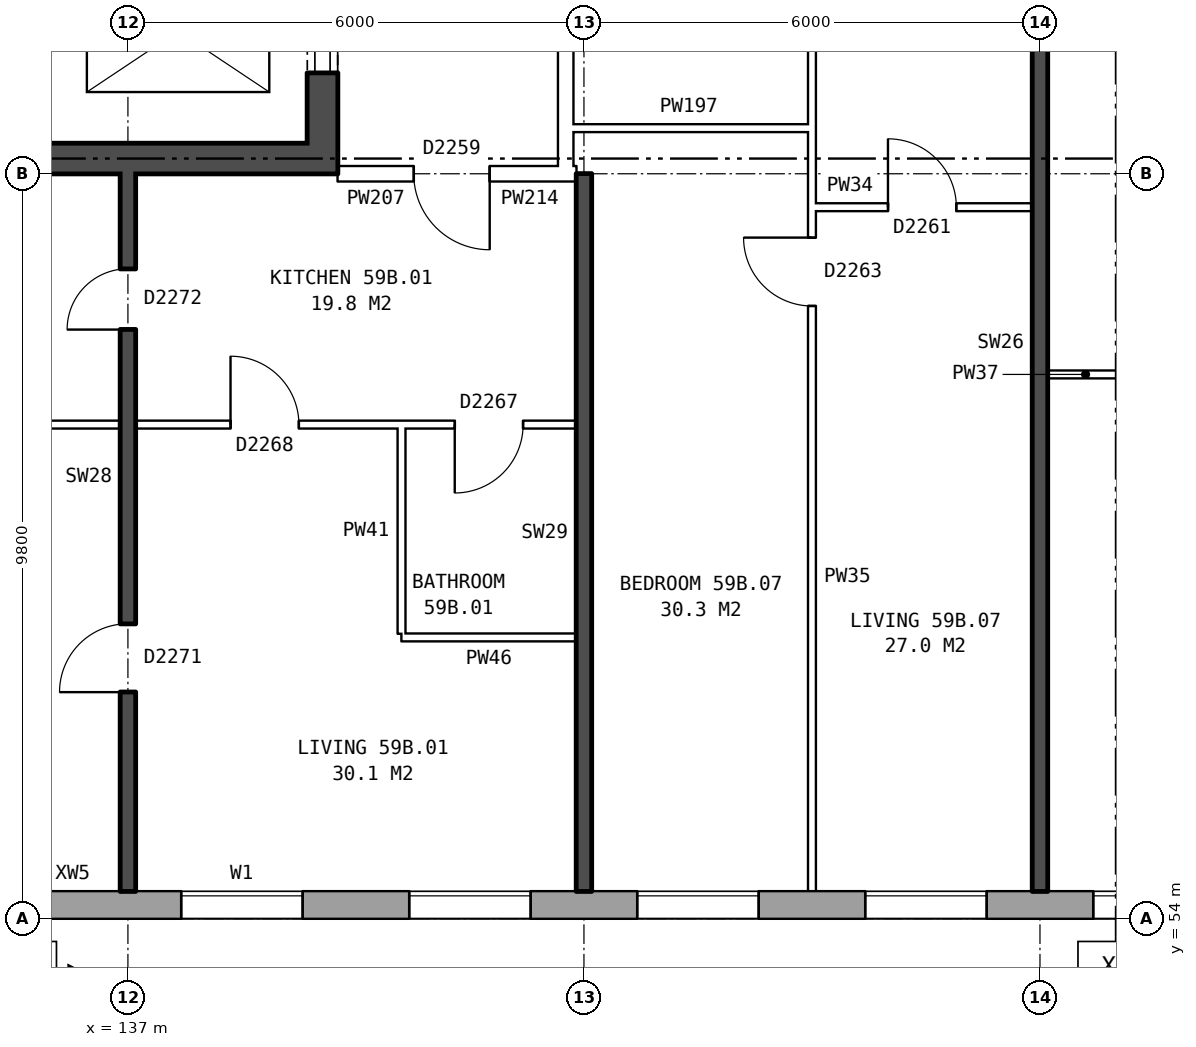
"""IFC4 building model, lengths in metres.
Left out: names, types, materials, properties, quantities, classifications, styles, units other than length and angle.
Written with IfcOpenShell. Run it as: python <this file> out.ifc"""

import sys

from ifc_helpers import new_model, si_unit, direction, frame, frame_2d, origin, place, context, subcontext, project, spatial, rectangle, extrude, element, fill, save


model = new_model("IFC4")
c1 = context("Model", 3, precision=1e-05, world=origin(), true_north=direction((0.0, 1.0)))
c2 = subcontext(c1, "Body", "Model", "MODEL_VIEW")
j1 = project(units=[si_unit("LENGTHUNIT", "METRE"), si_unit("PLANEANGLEUNIT", "RADIAN")], contexts=[c1])
p1 = place(None, origin())
s1 = spatial("IfcSite", under=j1, at=p1, CompositionType="ELEMENT")
p2 = place(p1, origin())
s2 = spatial("IfcBuilding", under=s1, at=p2, CompositionType="ELEMENT")
p3 = place(p2, frame((0.0, 0.0, 209.0)))
s3 = spatial("IfcBuildingStorey", under=s2, at=p3, CompositionType="ELEMENT", Elevation=209.0)
p4 = place(p3, frame((132.05, 54.18, 0.0), z_axis=(0.0, 0.0, 1.0), x_axis=(1.0, 0.0, 0.0)))
e1 = element("IfcWall", 1, at=p4, inside=s3, PredefinedType="STANDARD", context=c2, shape_type="SweptSolid", body=[
    extrude(rectangle(XDim=33.875, YDim=0.36, at=frame_2d((16.938, 0.0))), origin(), (0.0, 0.0, 1.0), 2.85),
])
p5 = place(p4, frame((0.3, 0.0, 0.8)))
e2 = element("IfcOpeningElement", 2, at=p5, cuts=e1, PredefinedType="OPENING", context=c2, shape_type="SweptSolid", body=[
    extrude(rectangle(XDim=1.4, YDim=1.8, at=frame_2d((0.7, 0.9))), frame((0.0, 0.19, 0.0), z_axis=(0.0, -1.0, 0.0), x_axis=(1.0, 0.0, 0.0)), (0.0, 0.0, 1.0), 0.38),
])
p6 = place(p4, frame((5.65, 0.0, 0.8)))
e3 = element("IfcOpeningElement", 3, at=p6, cuts=e1, PredefinedType="OPENING", context=c2, shape_type="SweptSolid", body=[
    extrude(rectangle(XDim=1.6, YDim=1.8, at=frame_2d((0.8, 0.9))), frame((0.0, 0.19, 0.0), z_axis=(0.0, -1.0, 0.0), x_axis=(1.0, 0.0, 0.0)), (0.0, 0.0, 1.0), 0.38),
])
p7 = place(p4, frame((8.65, 0.0, 0.8)))
e4 = element("IfcOpeningElement", 4, at=p7, cuts=e1, PredefinedType="OPENING", context=c2, shape_type="SweptSolid", body=[
    extrude(rectangle(XDim=1.6, YDim=1.8, at=frame_2d((0.8, 0.9))), frame((0.0, 0.19, 0.0), z_axis=(0.0, -1.0, 0.0), x_axis=(1.0, 0.0, 0.0)), (0.0, 0.0, 1.0), 0.38),
])
p8 = place(p4, frame((11.65, 0.0, 0.8)))
e5 = element("IfcOpeningElement", 5, at=p8, cuts=e1, PredefinedType="OPENING", context=c2, shape_type="SweptSolid", body=[
    extrude(rectangle(XDim=1.6, YDim=1.8, at=frame_2d((0.8, 0.9))), frame((0.0, 0.19, 0.0), z_axis=(0.0, -1.0, 0.0), x_axis=(1.0, 0.0, 0.0)), (0.0, 0.0, 1.0), 0.38),
])
p9 = place(p4, frame((14.65, 0.0, 0.8)))
e6 = element("IfcOpeningElement", 6, at=p9, cuts=e1, PredefinedType="OPENING", context=c2, shape_type="SweptSolid", body=[
    extrude(rectangle(XDim=1.6, YDim=1.8, at=frame_2d((0.8, 0.9))), frame((0.0, 0.19, 0.0), z_axis=(0.0, -1.0, 0.0), x_axis=(1.0, 0.0, 0.0)), (0.0, 0.0, 1.0), 0.38),
])
p10 = place(p4, frame((17.65, 0.0, 0.8)))
e7 = element("IfcOpeningElement", 7, at=p10, cuts=e1, PredefinedType="OPENING", context=c2, shape_type="SweptSolid", body=[
    extrude(rectangle(XDim=1.6, YDim=1.8, at=frame_2d((0.8, 0.9))), frame((0.0, 0.19, 0.0), z_axis=(0.0, -1.0, 0.0), x_axis=(1.0, 0.0, 0.0)), (0.0, 0.0, 1.0), 0.38),
])
p11 = place(p4, frame((20.65, 0.0, 0.8)))
e8 = element("IfcOpeningElement", 8, at=p11, cuts=e1, PredefinedType="OPENING", context=c2, shape_type="SweptSolid", body=[
    extrude(rectangle(XDim=1.6, YDim=1.8, at=frame_2d((0.8, 0.9))), frame((0.0, 0.19, 0.0), z_axis=(0.0, -1.0, 0.0), x_axis=(1.0, 0.0, 0.0)), (0.0, 0.0, 1.0), 0.38),
])
p12 = place(p4, frame((23.65, 0.0, 0.8)))
e9 = element("IfcOpeningElement", 9, at=p12, cuts=e1, PredefinedType="OPENING", context=c2, shape_type="SweptSolid", body=[
    extrude(rectangle(XDim=1.6, YDim=1.8, at=frame_2d((0.8, 0.9))), frame((0.0, 0.19, 0.0), z_axis=(0.0, -1.0, 0.0), x_axis=(1.0, 0.0, 0.0)), (0.0, 0.0, 1.0), 0.38),
])
p13 = place(p4, frame((26.65, 0.0, 0.8)))
e10 = element("IfcOpeningElement", 10, at=p13, cuts=e1, PredefinedType="OPENING", context=c2, shape_type="SweptSolid", body=[
    extrude(rectangle(XDim=1.6, YDim=1.8, at=frame_2d((0.8, 0.9))), frame((0.0, 0.19, 0.0), z_axis=(0.0, -1.0, 0.0), x_axis=(1.0, 0.0, 0.0)), (0.0, 0.0, 1.0), 0.38),
])
p14 = place(p4, frame((29.65, 0.0, 0.8)))
e11 = element("IfcOpeningElement", 11, at=p14, cuts=e1, PredefinedType="OPENING", context=c2, shape_type="SweptSolid", body=[
    extrude(rectangle(XDim=1.6, YDim=1.8, at=frame_2d((0.8, 0.9))), frame((0.0, 0.19, 0.0), z_axis=(0.0, -1.0, 0.0), x_axis=(1.0, 0.0, 0.0)), (0.0, 0.0, 1.0), 0.38),
])
p15 = place(p4, frame((2.0, 0.0, 0.9)))
e12 = element("IfcOpeningElement", 12, at=p15, cuts=e1, PredefinedType="OPENING", context=c2, shape_type="SweptSolid", body=[
    extrude(rectangle(XDim=0.8, YDim=1.5, at=frame_2d((0.4, 0.75))), frame((0.0, 0.19, 0.0), z_axis=(0.0, -1.0, 0.0), x_axis=(1.0, 0.0, 0.0)), (0.0, 0.0, 1.0), 0.38),
])
p16 = place(p3, frame((139.56, 63.8, 0.0), z_axis=(0.0, 0.0, 1.0), x_axis=(0.0, 1.0, 0.0)))
e13 = element("IfcWall", 13, at=p16, inside=s3, PredefinedType="SHEAR", context=c2, shape_type="SweptSolid", body=[
    extrude(rectangle(XDim=12.4, YDim=0.4, at=frame_2d((6.2, 0.0))), origin(), (0.0, 0.0, 1.0), 2.85),
])
p17 = place(p16, frame((1.325, 0.0, 0.0)))
e14 = element("IfcOpeningElement", 14, at=p17, cuts=e13, PredefinedType="OPENING", context=c2, shape_type="SweptSolid", body=[
    extrude(rectangle(XDim=1.1, YDim=2.1, at=frame_2d((0.55, 1.05))), frame((0.0, 0.21, 0.0), z_axis=(0.0, -1.0, 0.0), x_axis=(1.0, 0.0, 0.0)), (0.0, 0.0, 1.0), 0.42),
])
p18 = place(p16, frame((3.6, 0.0, 0.0)))
e15 = element("IfcOpeningElement", 15, at=p18, cuts=e13, PredefinedType="OPENING", context=c2, shape_type="SweptSolid", body=[
    extrude(rectangle(XDim=1.1, YDim=2.1, at=frame_2d((0.55, 1.05))), frame((0.0, 0.21, 0.0), z_axis=(0.0, -1.0, 0.0), x_axis=(1.0, 0.0, 0.0)), (0.0, 0.0, 1.0), 0.42),
])
p19 = place(p16, frame((5.8, 0.0, 0.0)))
e16 = element("IfcOpeningElement", 16, at=p19, cuts=e13, PredefinedType="OPENING", context=c2, shape_type="SweptSolid", body=[
    extrude(rectangle(XDim=1.1, YDim=2.1, at=frame_2d((0.55, 1.05))), frame((0.0, 0.21, 0.0), z_axis=(0.0, -1.0, 0.0), x_axis=(1.0, 0.0, 0.0)), (0.0, 0.0, 1.0), 0.42),
])
p20 = place(p16, frame((9.9, 0.0, 0.0)))
e17 = element("IfcOpeningElement", 17, at=p20, cuts=e13, PredefinedType="OPENING", context=c2, shape_type="SweptSolid", body=[
    extrude(rectangle(XDim=1.1, YDim=2.1, at=frame_2d((0.55, 1.05))), frame((0.0, 0.21, 0.0), z_axis=(0.0, -1.0, 0.0), x_axis=(1.0, 0.0, 0.0)), (0.0, 0.0, 1.0), 0.42),
])
p21 = place(p16, frame((8.125, 0.0, 0.0)))
e18 = element("IfcOpeningElement", 18, at=p21, cuts=e13, PredefinedType="OPENING", context=c2, shape_type="SweptSolid", body=[
    extrude(rectangle(XDim=0.85, YDim=2.1, at=frame_2d((0.425, 1.05))), frame((0.0, 0.21, 0.0), z_axis=(0.0, -1.0, 0.0), x_axis=(1.0, 0.0, 0.0)), (0.0, 0.0, 1.0), 0.42),
])
p22 = place(p3, frame((139.36, 64.0, 0.0), z_axis=(0.0, 0.0, 1.0), x_axis=(-1.0, 0.0, 0.0)))
e19 = element("IfcWall", 19, at=p22, inside=s3, PredefinedType="SHEAR", context=c2, shape_type="SweptSolid", body=[
    extrude(rectangle(XDim=7.6, YDim=0.4, at=frame_2d((3.8, 0.0))), origin(), (0.0, 0.0, 1.0), 2.85),
])
p23 = place(p3, frame((142.76, 63.9, 0.0), z_axis=(0.0, 0.0, 1.0), x_axis=(0.0, 1.0, 0.0)))
e20 = element("IfcWall", 20, at=p23, inside=s3, PredefinedType="PARTITIONING", context=c2, shape_type="SweptSolid", body=[
    extrude(rectangle(XDim=12.2, YDim=0.2, at=frame_2d((6.1, 0.0))), origin(), (0.0, 0.0, 1.0), 2.85),
])
p24 = place(p23, frame((5.1, 0.0, 0.0)))
e21 = element("IfcOpeningElement", 21, at=p24, cuts=e20, PredefinedType="OPENING", context=c2, shape_type="SweptSolid", body=[
    extrude(rectangle(XDim=2.0, YDim=2.1, at=frame_2d((1.0, 1.05))), frame((0.0, 0.11, 0.0), z_axis=(0.0, -1.0, 0.0), x_axis=(1.0, 0.0, 0.0)), (0.0, 0.0, 1.0), 0.22),
])
p25 = place(p3, frame((140.6, 57.7, 0.0), z_axis=(0.0, 0.0, 1.0), x_axis=(1.0, 0.0, 0.0)))
e22 = element("IfcWall", 22, at=p25, inside=s3, PredefinedType="PARTITIONING", context=c2, shape_type="SweptSolid", body=[
    extrude(rectangle(XDim=2.3, YDim=0.1, at=frame_2d((1.15, 0.0))), origin(), (0.0, 0.0, 1.0), 2.85),
])
p26 = place(p3, frame((131.1, 60.5, 0.0), z_axis=(0.0, 0.0, 1.0), x_axis=(1.0, 0.0, 0.0)))
e23 = element("IfcWall", 23, at=p26, inside=s3, PredefinedType="PARTITIONING", context=c2, shape_type="SweptSolid", body=[
    extrude(rectangle(XDim=11.8, YDim=0.1, at=frame_2d((5.9, 0.0))), origin(), (0.0, 0.0, 1.0), 2.85),
])
p27 = place(p26, frame((7.25, 0.0, 0.0)))
e24 = element("IfcOpeningElement", 24, at=p27, cuts=e23, PredefinedType="OPENING", context=c2, shape_type="SweptSolid", body=[
    extrude(rectangle(XDim=0.9, YDim=2.1, at=frame_2d((0.45, 1.05))), frame((0.0, 0.06, 0.0), z_axis=(0.0, -1.0, 0.0), x_axis=(1.0, 0.0, 0.0)), (0.0, 0.0, 1.0), 0.12),
])
p28 = place(p26, frame((10.2, 0.0, 0.0)))
e25 = element("IfcOpeningElement", 25, at=p28, cuts=e23, PredefinedType="OPENING", context=c2, shape_type="SweptSolid", body=[
    extrude(rectangle(XDim=0.9, YDim=2.1, at=frame_2d((0.45, 1.05))), frame((0.0, 0.06, 0.0), z_axis=(0.0, -1.0, 0.0), x_axis=(1.0, 0.0, 0.0)), (0.0, 0.0, 1.0), 0.12),
])
p29 = place(p3, frame((149.1, 61.16, 0.0), z_axis=(0.0, 0.0, 1.0), x_axis=(1.0, 0.0, 0.0)))
e26 = element("IfcWall", 26, at=p29, inside=s3, PredefinedType="PARTITIONING", context=c2, shape_type="SweptSolid", body=[
    extrude(rectangle(XDim=2.9, YDim=0.1, at=frame_2d((1.45, 0.0))), origin(), (0.0, 0.0, 1.0), 2.85),
])
p30 = place(p29, frame((1.0, 0.0, 0.0)))
e27 = element("IfcOpeningElement", 27, at=p30, cuts=e26, PredefinedType="OPENING", context=c2, shape_type="SweptSolid", body=[
    extrude(rectangle(XDim=0.9, YDim=2.1, at=frame_2d((0.45, 1.05))), frame((0.0, 0.06, 0.0), z_axis=(0.0, -1.0, 0.0), x_axis=(1.0, 0.0, 0.0)), (0.0, 0.0, 1.0), 0.12),
])
p31 = place(p3, frame((146.0, 63.36, 0.0), z_axis=(0.0, 0.0, 1.0), x_axis=(1.0, 0.0, 0.0)))
e28 = element("IfcWall", 28, at=p31, inside=s3, PredefinedType="PARTITIONING", context=c2, shape_type="SweptSolid", body=[
    extrude(rectangle(XDim=2.9, YDim=0.1, at=frame_2d((1.45, 0.0))), origin(), (0.0, 0.0, 1.0), 2.85),
])
p32 = place(p31, frame((1.0, 0.0, 0.0)))
e29 = element("IfcOpeningElement", 29, at=p32, cuts=e28, PredefinedType="OPENING", context=c2, shape_type="SweptSolid", body=[
    extrude(rectangle(XDim=0.9, YDim=2.1, at=frame_2d((0.45, 1.05))), frame((0.0, 0.06, 0.0), z_axis=(0.0, -1.0, 0.0), x_axis=(1.0, 0.0, 0.0)), (0.0, 0.0, 1.0), 0.12),
])
p33 = place(p3, frame((139.76, 63.8, 0.0), z_axis=(0.0, 0.0, 1.0), x_axis=(1.0, 0.0, 0.0)))
e30 = element("IfcWall", 30, at=p33, inside=s3, PredefinedType="PARTITIONING", context=c2, shape_type="SweptSolid", body=[
    extrude(rectangle(XDim=3.0, YDim=0.2, at=frame_2d((1.5, 0.0))), origin(), (0.0, 0.0, 1.0), 2.85),
])
p34 = place(p33, frame((1.0, 0.0, 0.0)))
e31 = element("IfcOpeningElement", 31, at=p34, cuts=e30, PredefinedType="OPENING", context=c2, shape_type="SweptSolid", body=[
    extrude(rectangle(XDim=1.0, YDim=2.1, at=frame_2d((0.5, 1.05))), frame((0.0, 0.11, 0.0), z_axis=(0.0, -1.0, 0.0), x_axis=(1.0, 0.0, 0.0)), (0.0, 0.0, 1.0), 0.22),
])
p35 = place(p3, frame((142.76, 63.8, 0.0), z_axis=(0.0, 0.0, 1.0), x_axis=(1.0, 0.0, 0.0)))
e32 = element("IfcWall", 32, at=p35, inside=s3, PredefinedType="PARTITIONING", context=c2, shape_type="SweptSolid", body=[
    extrude(rectangle(XDim=0.14, YDim=0.2, at=frame_2d((0.07, 0.0))), origin(), (0.0, 0.0, 1.0), 2.85),
])
p36 = place(p3, frame((142.76, 64.4, 0.0), z_axis=(0.0, 0.0, 1.0), x_axis=(1.0, 0.0, 0.0)))
e33 = element("IfcWall", 33, at=p36, inside=s3, PredefinedType="PARTITIONING", context=c2, shape_type="SweptSolid", body=[
    extrude(rectangle(XDim=3.24, YDim=0.1, at=frame_2d((1.62, 0.0))), origin(), (0.0, 0.0, 1.0), 2.85),
])
p37 = place(p3, frame((137.0, 54.36, 0.0), z_axis=(0.0, 0.0, 1.0), x_axis=(0.0, 1.0, 0.0)))
e34 = element("IfcWall", 34, at=p37, inside=s3, PredefinedType="SOLIDWALL", context=c2, shape_type="SweptSolid", body=[
    extrude(rectangle(XDim=9.44, YDim=0.2, at=frame_2d((4.72, 0.0))), origin(), (0.0, 0.0, 1.0), 2.85),
])
p38 = place(p37, frame((2.62, 0.0, 0.0)))
e35 = element("IfcOpeningElement", 35, at=p38, cuts=e34, PredefinedType="OPENING", context=c2, shape_type="SweptSolid", body=[
    extrude(rectangle(XDim=0.9, YDim=2.1, at=frame_2d((0.45, 1.05))), frame((0.0, 0.11, 0.0), z_axis=(0.0, -1.0, 0.0), x_axis=(1.0, 0.0, 0.0)), (0.0, 0.0, 1.0), 0.22),
])
p39 = place(p37, frame((7.39, 0.0, 0.0)))
e36 = element("IfcOpeningElement", 36, at=p39, cuts=e34, PredefinedType="OPENING", context=c2, shape_type="SweptSolid", body=[
    extrude(rectangle(XDim=0.8, YDim=2.1, at=frame_2d((0.4, 1.05))), frame((0.0, 0.11, 0.0), z_axis=(0.0, -1.0, 0.0), x_axis=(1.0, 0.0, 0.0)), (0.0, 0.0, 1.0), 0.22),
])
p40 = place(p3, frame((140.6, 57.75, 0.0), z_axis=(0.0, 0.0, 1.0), x_axis=(0.0, 1.0, 0.0)))
e37 = element("IfcWall", 37, at=p40, inside=s3, PredefinedType="PARTITIONING", context=c2, shape_type="SweptSolid", body=[
    extrude(rectangle(XDim=2.7, YDim=0.1, at=frame_2d((1.35, 0.0))), origin(), (0.0, 0.0, 1.0), 2.85),
])
p41 = place(p3, frame((143.0, 54.36, 0.0), z_axis=(0.0, 0.0, 1.0), x_axis=(0.0, 1.0, 0.0)))
e38 = element("IfcWall", 38, at=p41, inside=s3, PredefinedType="SOLIDWALL", context=c2, shape_type="SweptSolid", body=[
    extrude(rectangle(XDim=9.44, YDim=0.2, at=frame_2d((4.72, 0.0))), origin(), (0.0, 0.0, 1.0), 2.85),
])
p42 = place(p3, frame((146.0, 54.36, 0.0), z_axis=(0.0, 0.0, 1.0), x_axis=(0.0, 1.0, 0.0)))
e39 = element("IfcWall", 39, at=p42, inside=s3, PredefinedType="PARTITIONING", context=c2, shape_type="SweptSolid", body=[
    extrude(rectangle(XDim=14.34, YDim=0.1, at=frame_2d((7.17, 0.0))), origin(), (0.0, 0.0, 1.0), 2.85),
])
p43 = place(p42, frame((7.7, 0.0, 0.0)))
e40 = element("IfcOpeningElement", 40, at=p43, cuts=e39, PredefinedType="OPENING", context=c2, shape_type="SweptSolid", body=[
    extrude(rectangle(XDim=0.9, YDim=2.1, at=frame_2d((0.45, 1.05))), frame((0.0, 0.06, 0.0), z_axis=(0.0, -1.0, 0.0), x_axis=(1.0, 0.0, 0.0)), (0.0, 0.0, 1.0), 0.12),
])
p44 = place(p42, frame((13.04, 0.0, 0.0)))
e41 = element("IfcOpeningElement", 41, at=p44, cuts=e39, PredefinedType="OPENING", context=c2, shape_type="SweptSolid", body=[
    extrude(rectangle(XDim=0.9, YDim=2.1, at=frame_2d((0.45, 1.05))), frame((0.0, 0.06, 0.0), z_axis=(0.0, -1.0, 0.0), x_axis=(1.0, 0.0, 0.0)), (0.0, 0.0, 1.0), 0.12),
])
p45 = place(p3, frame((149.0, 54.36, 0.0), z_axis=(0.0, 0.0, 1.0), x_axis=(0.0, 1.0, 0.0)))
e42 = element("IfcWall", 42, at=p45, inside=s3, PredefinedType="SOLIDWALL", context=c2, shape_type="SweptSolid", body=[
    extrude(rectangle(XDim=14.44, YDim=0.2, at=frame_2d((7.22, 0.0))), origin(), (0.0, 0.0, 1.0), 2.85),
])
p46 = place(p6, origin())
e43 = element("IfcWindow", 43, at=p46, inside=s3, PartitioningType="SINGLE_PANEL", PredefinedType="WINDOW", context=c2, shape_type="SweptSolid", body=[
    extrude(rectangle(XDim=1.6, YDim=1.8, at=frame_2d((0.8, 0.9))), frame((0.0, 0.15, 0.0), z_axis=(0.0, -1.0, 0.0), x_axis=(1.0, 0.0, 0.0)), (0.0, 0.0, 1.0), 0.06),
])
fill(e3, e43)
p47 = place(p7, origin())
e44 = element("IfcWindow", 44, at=p47, inside=s3, PartitioningType="SINGLE_PANEL", PredefinedType="WINDOW", context=c2, shape_type="SweptSolid", body=[
    extrude(rectangle(XDim=1.6, YDim=1.8, at=frame_2d((0.8, 0.9))), frame((0.0, 0.15, 0.0), z_axis=(0.0, -1.0, 0.0), x_axis=(1.0, 0.0, 0.0)), (0.0, 0.0, 1.0), 0.06),
])
fill(e4, e44)
p48 = place(p8, origin())
e45 = element("IfcWindow", 45, at=p48, inside=s3, PartitioningType="SINGLE_PANEL", PredefinedType="WINDOW", context=c2, shape_type="SweptSolid", body=[
    extrude(rectangle(XDim=1.6, YDim=1.8, at=frame_2d((0.8, 0.9))), frame((0.0, 0.15, 0.0), z_axis=(0.0, -1.0, 0.0), x_axis=(1.0, 0.0, 0.0)), (0.0, 0.0, 1.0), 0.06),
])
fill(e5, e45)
p49 = place(p9, origin())
e46 = element("IfcWindow", 46, at=p49, inside=s3, PartitioningType="SINGLE_PANEL", PredefinedType="WINDOW", context=c2, shape_type="SweptSolid", body=[
    extrude(rectangle(XDim=1.6, YDim=1.8, at=frame_2d((0.8, 0.9))), frame((0.0, 0.15, 0.0), z_axis=(0.0, -1.0, 0.0), x_axis=(1.0, 0.0, 0.0)), (0.0, 0.0, 1.0), 0.06),
])
fill(e6, e46)
p50 = place(p10, origin())
e47 = element("IfcWindow", 47, at=p50, inside=s3, PartitioningType="SINGLE_PANEL", PredefinedType="WINDOW", context=c2, shape_type="SweptSolid", body=[
    extrude(rectangle(XDim=1.6, YDim=1.8, at=frame_2d((0.8, 0.9))), frame((0.0, 0.15, 0.0), z_axis=(0.0, -1.0, 0.0), x_axis=(1.0, 0.0, 0.0)), (0.0, 0.0, 1.0), 0.06),
])
fill(e7, e47)
p51 = place(p17, origin())
e48 = element("IfcDoor", 48, at=p51, inside=s3, OperationType="DOUBLE_DOOR_SLIDING", PredefinedType="DOOR", context=c2, shape_type="SweptSolid", body=[
    extrude(rectangle(XDim=1.1, YDim=2.1, at=frame_2d((0.55, 1.05))), frame((0.0, 0.185, 0.0), z_axis=(0.0, -1.0, 0.0), x_axis=(1.0, 0.0, 0.0)), (0.0, 0.0, 1.0), 0.05),
])
fill(e14, e48)
p52 = place(p38, origin())
e49 = element("IfcDoor", 49, at=p52, inside=s3, OperationType="SINGLE_SWING_LEFT", PredefinedType="DOOR", context=c2, shape_type="SweptSolid", body=[
    extrude(rectangle(XDim=0.9, YDim=2.1, at=frame_2d((0.45, 1.05))), frame((0.0, 0.025, 0.0), z_axis=(0.0, -1.0, 0.0), x_axis=(1.0, 0.0, 0.0)), (0.0, 0.0, 1.0), 0.05),
])
fill(e35, e49)
p53 = place(p34, frame((1.0, 0.0, 0.0), z_axis=(0.0, 0.0, 1.0), x_axis=(-1.0, 0.0, 0.0)))
e50 = element("IfcDoor", 50, at=p53, inside=s3, OperationType="SINGLE_SWING_LEFT", PredefinedType="DOOR", context=c2, shape_type="SweptSolid", body=[
    extrude(rectangle(XDim=1.0, YDim=2.1, at=frame_2d((0.5, 1.05))), frame((0.0, 0.025, 0.0), z_axis=(0.0, -1.0, 0.0), x_axis=(1.0, 0.0, 0.0)), (0.0, 0.0, 1.0), 0.05),
])
fill(e31, e50)
p54 = place(p27, origin())
e51 = element("IfcDoor", 51, at=p54, inside=s3, OperationType="SINGLE_SWING_LEFT", PredefinedType="DOOR", context=c2, shape_type="SweptSolid", body=[
    extrude(rectangle(XDim=0.9, YDim=2.1, at=frame_2d((0.45, 1.05))), frame((0.0, 0.025, 0.0), z_axis=(0.0, -1.0, 0.0), x_axis=(1.0, 0.0, 0.0)), (0.0, 0.0, 1.0), 0.05),
])
fill(e24, e51)
p55 = place(p39, origin())
e52 = element("IfcDoor", 52, at=p55, inside=s3, OperationType="SINGLE_SWING_LEFT", PredefinedType="DOOR", context=c2, shape_type="SweptSolid", body=[
    extrude(rectangle(XDim=0.8, YDim=2.1, at=frame_2d((0.4, 1.05))), frame((0.0, 0.025, 0.0), z_axis=(0.0, -1.0, 0.0), x_axis=(1.0, 0.0, 0.0)), (0.0, 0.0, 1.0), 0.05),
])
fill(e36, e52)
p56 = place(p28, frame((0.9, 0.0, 0.0), z_axis=(0.0, 0.0, 1.0), x_axis=(-1.0, 0.0, 0.0)))
e53 = element("IfcDoor", 53, at=p56, inside=s3, OperationType="SINGLE_SWING_RIGHT", PredefinedType="DOOR", context=c2, shape_type="SweptSolid", body=[
    extrude(rectangle(XDim=0.9, YDim=2.1, at=frame_2d((0.45, 1.05))), frame((0.0, 0.025, 0.0), z_axis=(0.0, -1.0, 0.0), x_axis=(1.0, 0.0, 0.0)), (0.0, 0.0, 1.0), 0.05),
])
fill(e25, e53)
p57 = place(p43, origin())
e54 = element("IfcDoor", 54, at=p57, inside=s3, OperationType="SINGLE_SWING_RIGHT", PredefinedType="DOOR", context=c2, shape_type="SweptSolid", body=[
    extrude(rectangle(XDim=0.9, YDim=2.1, at=frame_2d((0.45, 1.05))), frame((0.0, 0.025, 0.0), z_axis=(0.0, -1.0, 0.0), x_axis=(1.0, 0.0, 0.0)), (0.0, 0.0, 1.0), 0.05),
])
fill(e40, e54)
p58 = place(p32, origin())
e55 = element("IfcDoor", 55, at=p58, inside=s3, OperationType="SINGLE_SWING_LEFT", PredefinedType="DOOR", context=c2, shape_type="SweptSolid", body=[
    extrude(rectangle(XDim=0.9, YDim=2.1, at=frame_2d((0.45, 1.05))), frame((0.0, 0.025, 0.0), z_axis=(0.0, -1.0, 0.0), x_axis=(1.0, 0.0, 0.0)), (0.0, 0.0, 1.0), 0.05),
])
fill(e29, e55)
save(model, sys.argv[1])
